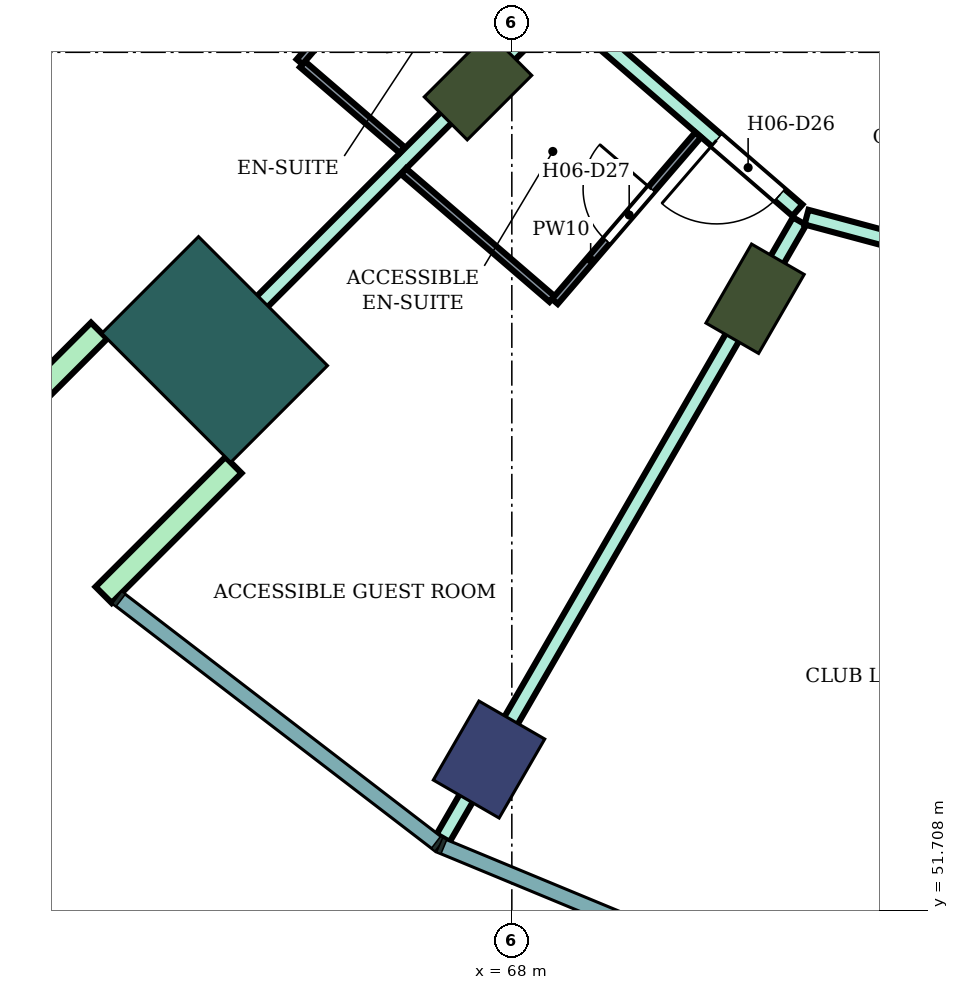
"""IFC4 building model, lengths in metres.
Left out: names, types, materials, properties, quantities, classifications, styles, units other than length and angle.
Written with IfcOpenShell. Run it as: python <this file> out.ifc"""

import sys

from ifc_helpers import new_model, si_unit, direction, frame, frame_2d, origin, origin_2d, place, context, subcontext, project, spatial, rectangle, extrude, element, fill, save


model = new_model("IFC4")
c1 = context("Model", 3, precision=1e-05, world=origin(), true_north=direction((0.0, 1.0)))
c2 = subcontext(c1, "Body", "Model", "MODEL_VIEW")
j1 = project(units=[si_unit("LENGTHUNIT", "METRE"), si_unit("PLANEANGLEUNIT", "RADIAN")], contexts=[c1])
p1 = place(None, origin())
s1 = spatial("IfcSite", under=j1, at=p1, CompositionType="ELEMENT")
p2 = place(p1, origin())
s2 = spatial("IfcBuilding", under=s1, at=p2, CompositionType="ELEMENT")
p3 = place(p2, frame((0.0, 0.0, 101.4)))
s3 = spatial("IfcBuildingStorey", under=s2, at=p3, CompositionType="ELEMENT", Elevation=101.4)
p4 = place(p3, frame((67.7, 53.696, 0.0), z_axis=(0.0, 0.0, 1.0), x_axis=(-0.5, -0.866025403784, 0.0)))
e1 = element("IfcColumn", 1, at=p4, inside=s3, PredefinedType="COLUMN", context=c2, shape_type="SweptSolid", body=[
    extrude(rectangle(XDim=1.2, YDim=1.0, at=origin_2d()), origin(), (0.0, 0.0, 1.0), 3.8),
])
for number, where, z_axis, x_axis in (
    (2, (67.555, 62.555, 0.0), (0.0, 0.0, 1.0), (-0.707, -0.707, 0.0)),
    (3, (71.2, 59.758, 0.0), (0.0, 0.0, 1.0), (-0.5, -0.866, 0.0)),
):
    element("IfcColumn", number, at=place(p3, frame(where, z_axis=z_axis, x_axis=x_axis)), inside=s3, PredefinedType="COLUMN", context=c2, shape_type="SweptSolid", body=[
        extrude(rectangle(XDim=1.2, YDim=0.8, at=origin_2d()), origin(), (0.0, 0.0, 1.0), 3.8),
    ])
p5 = place(p3, frame((64.09, 59.09, 0.0), z_axis=(0.0, 0.0, 1.0), x_axis=(-0.707106781187, -0.707106781187, 0.0)))
e4 = element("IfcColumn", 4, at=p5, inside=s3, PredefinedType="COLUMN", context=c2, shape_type="SweptSolid", body=[
    extrude(rectangle(XDim=1.8, YDim=2.4, at=origin_2d()), origin(), (0.0, 0.0, 1.0), 3.8),
])
for number, where, z_axis, x_axis in (
    (5, (62.57, 59.338, 0.0), (0.0, 0.0, 1.0), (-0.707, -0.707, 0.0)),
    (6, (64.338, 57.57, 0.0), (0.0, 0.0, 1.0), (-0.707, -0.707, 0.0)),
):
    element("IfcWall", number, at=place(p3, frame(where, z_axis=z_axis, x_axis=x_axis)), inside=s3, PredefinedType="NOTDEFINED", context=c2, shape_type="SweptSolid", body=[
        extrude(rectangle(XDim=2.416, YDim=0.3, at=frame_2d((1.208, 0.0))), origin(), (0.0, 0.0, 1.0), 3.8),
    ])
p6 = place(p3, frame((63.594, 58.598, 0.0), z_axis=(0.0, 0.0, 1.0), x_axis=(0.707228748718, 0.706984792613, 0.0)))
e7 = element("IfcWall", 7, at=p6, inside=s3, PredefinedType="PARTITIONING", context=c2, shape_type="SweptSolid", body=[
    extrude(rectangle(XDim=7.005, YDim=0.2, at=frame_2d((3.503, 0.0))), origin(), (0.0, 0.0, 1.0), 3.35),
])
p7 = place(p3, frame((67.079, 64.968, 0.0), z_axis=(0.0, 0.0, 1.0), x_axis=(0.756371089567, -0.654142778656, 0.0)))
e8 = element("IfcWall", 8, at=p7, inside=s3, PredefinedType="PARTITIONING", context=c2, shape_type="SweptSolid", body=[
    extrude(rectangle(XDim=6.185, YDim=0.2, at=frame_2d((3.093, 0.0))), origin(), (0.0, 0.0, 1.0), 3.35),
])
p8 = place(p7, frame((4.778, 0.0, 0.0)))
e9 = element("IfcOpeningElement", 9, at=p8, cuts=e8, PredefinedType="OPENING", context=c2, shape_type="SweptSolid", body=[
    extrude(rectangle(XDim=1.1, YDim=2.1, at=frame_2d((0.55, 1.05))), frame((0.0, 0.11, 0.0), z_axis=(0.0, -1.0, 0.0), x_axis=(1.0, 0.0, 0.0)), (0.0, 0.0, 1.0), 0.22),
])
p9 = place(p3, frame((67.096, 52.662, 0.0), z_axis=(0.0, 0.0, 1.0), x_axis=(0.500222922337, 0.865896661253, 0.0)))
e10 = element("IfcWall", 10, at=p9, inside=s3, PredefinedType="PARTITIONING", context=c2, shape_type="SweptSolid", body=[
    extrude(rectangle(XDim=9.374, YDim=0.2, at=frame_2d((4.687, 0.0))), origin(), (0.0, 0.0, 1.0), 3.35),
])
p10 = place(p3, frame((71.877, 60.831, 0.0), z_axis=(0.0, 0.0, 1.0), x_axis=(0.965905026676, -0.258896657842, 0.0)))
e11 = element("IfcWall", 11, at=p10, inside=s3, PredefinedType="PARTITIONING", context=c2, shape_type="SweptSolid", body=[
    extrude(rectangle(XDim=8.36, YDim=0.2, at=frame_2d((4.18, 0.0))), origin(), (0.0, 0.0, 1.0), 3.35),
])
p11 = place(p10, frame((4.655, 0.0, 0.0)))
e12 = element("IfcOpeningElement", 12, at=p11, cuts=e11, PredefinedType="OPENING", context=c2, shape_type="SweptSolid", body=[
    extrude(rectangle(XDim=1.8, YDim=2.1, at=frame_2d((0.9, 1.05))), frame((0.0, 0.11, 0.0), z_axis=(0.0, -1.0, 0.0), x_axis=(1.0, 0.0, 0.0)), (0.0, 0.0, 1.0), 0.22),
])
p12 = place(p3, frame((65.246, 62.842, 0.0), z_axis=(0.0, 0.0, 1.0), x_axis=(0.758030338995, -0.652219292234, 0.0)))
e13 = element("IfcWall", 13, at=p12, inside=s3, PredefinedType="PARTITIONING", context=c2, shape_type="SweptSolid", body=[
    extrude(rectangle(XDim=1.73, YDim=0.1, at=frame_2d((0.865, 0.0))), origin(), (0.0, 0.0, 1.0), 3.35),
])
p13 = place(p3, frame((65.208, 62.875, 0.0), z_axis=(0.0, 0.0, 1.0), x_axis=(0.65205430601, 0.758172264076, 0.0)))
e14 = element("IfcWall", 14, at=p13, inside=s3, PredefinedType="PARTITIONING", context=c2, shape_type="SweptSolid", body=[
    extrude(rectangle(XDim=2.8, YDim=0.1, at=frame_2d((1.4, 0.0))), origin(), (0.0, 0.0, 1.0), 3.35),
])
p14 = place(p13, frame((0.85, 0.0, 0.0)))
e15 = element("IfcOpeningElement", 15, at=p14, cuts=e14, PredefinedType="OPENING", context=c2, shape_type="SweptSolid", body=[
    extrude(rectangle(XDim=0.8, YDim=2.1, at=frame_2d((0.4, 1.05))), frame((0.0, 0.06, 0.0), z_axis=(0.0, -1.0, 0.0), x_axis=(1.0, 0.0, 0.0)), (0.0, 0.0, 1.0), 0.12),
])
p15 = place(p3, frame((66.576, 61.435, 0.0), z_axis=(0.0, 0.0, 1.0), x_axis=(0.757970550281, -0.652288774169, 0.0)))
e16 = element("IfcWall", 16, at=p15, inside=s3, PredefinedType="PARTITIONING", context=c2, shape_type="SweptSolid", body=[
    extrude(rectangle(XDim=2.576, YDim=0.1, at=frame_2d((1.288, 0.0))), origin(), (0.0, 0.0, 1.0), 3.35),
])
p16 = place(p3, frame((68.566, 59.722, 0.0), z_axis=(0.0, 0.0, 1.0), x_axis=(0.65193146671, 0.758277892803, 0.0)))
e17 = element("IfcWall", 17, at=p16, inside=s3, PredefinedType="PARTITIONING", context=c2, shape_type="SweptSolid", body=[
    extrude(rectangle(XDim=2.89, YDim=0.1, at=frame_2d((1.445, 0.0))), origin(), (0.0, 0.0, 1.0), 3.35),
])
p17 = place(p16, frame((1.05, 0.0, 0.0)))
e18 = element("IfcOpeningElement", 18, at=p17, cuts=e17, PredefinedType="OPENING", context=c2, shape_type="SweptSolid", body=[
    extrude(rectangle(XDim=0.9, YDim=2.1, at=frame_2d((0.45, 1.05))), frame((0.0, 0.06, 0.0), z_axis=(0.0, -1.0, 0.0), x_axis=(1.0, 0.0, 0.0)), (0.0, 0.0, 1.0), 0.12),
])
p18 = place(p8, frame((1.1, 0.0, 0.0), z_axis=(0.0, 0.0, 1.0), x_axis=(-1.0, 0.0, 0.0)))
e19 = element("IfcDoor", 19, at=p18, inside=s3, OperationType="SINGLE_SWING_RIGHT", PredefinedType="DOOR", context=c2, shape_type="SweptSolid", body=[
    extrude(rectangle(XDim=1.1, YDim=2.1, at=frame_2d((0.55, 1.05))), frame((0.0, 0.025, 0.0), z_axis=(0.0, -1.0, 0.0), x_axis=(1.0, 0.0, 0.0)), (0.0, 0.0, 1.0), 0.05),
])
fill(e9, e19)
p19 = place(p17, origin())
e20 = element("IfcDoor", 20, at=p19, inside=s3, OperationType="SINGLE_SWING_RIGHT", PredefinedType="DOOR", context=c2, shape_type="SweptSolid", body=[
    extrude(rectangle(XDim=0.9, YDim=2.1, at=frame_2d((0.45, 1.05))), frame((0.0, 0.025, 0.0), z_axis=(0.0, -1.0, 0.0), x_axis=(1.0, 0.0, 0.0)), (0.0, 0.0, 1.0), 0.05),
])
fill(e18, e20)
save(model, sys.argv[1])
